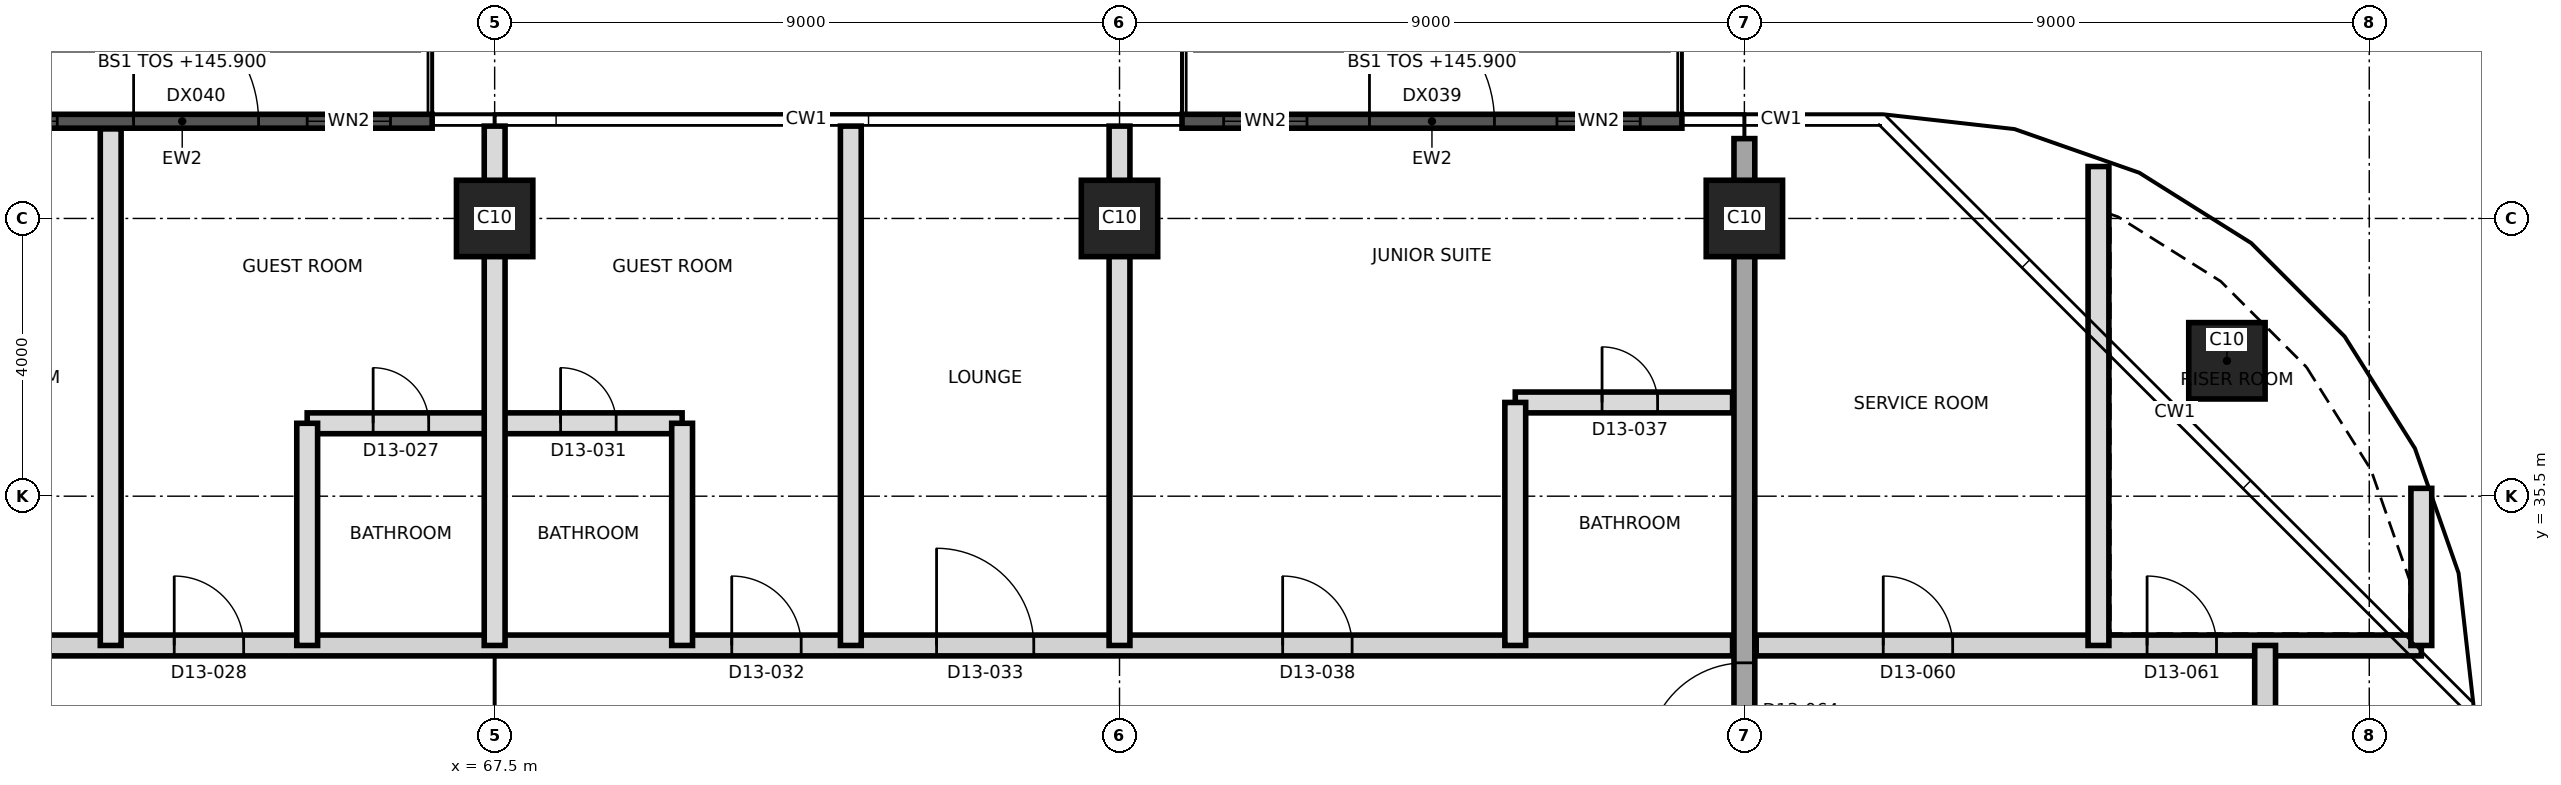
"""IFC4 building model, lengths in metres.
Left out: names, types, materials, properties, quantities, classifications, styles, units other than length and angle.
Written with IfcOpenShell. Run it as: python <this file> out.ifc"""

import sys

from ifc_helpers import new_model, si_unit, direction, frame, frame_2d, origin, origin_2d, place, context, subcontext, project, spatial, rectangle, extrude, element, fill, save


model = new_model("IFC4")
c1 = context("Model", 3, precision=1e-05, world=origin(), true_north=direction((0.0, 1.0)))
c2 = subcontext(c1, "Body", "Model", "MODEL_VIEW")
j1 = project(units=[si_unit("LENGTHUNIT", "METRE"), si_unit("PLANEANGLEUNIT", "RADIAN")], contexts=[c1])
p1 = place(None, origin())
s1 = spatial("IfcSite", under=j1, at=p1, CompositionType="ELEMENT")
p2 = place(p1, origin())
s2 = spatial("IfcBuilding", under=s1, at=p2, CompositionType="ELEMENT")
p3 = place(p2, frame((0.0, 0.0, 145.9)))
s3 = spatial("IfcBuildingStorey", under=s2, at=p3, CompositionType="ELEMENT", Elevation=145.9)
for number, where, z_axis, x_axis in (
    (1, (92.45, 37.45, 0.0), (0.0, 0.0, 1.0), (1.0, 0.0, 0.0)),
    (2, (67.5, 39.5, 0.0), (0.0, 0.0, 1.0), (1.0, 0.0, 0.0)),
    (3, (76.5, 39.5, 0.0), (0.0, 0.0, 1.0), (1.0, 0.0, 0.0)),
    (4, (85.5, 39.5, 0.0), (0.0, 0.0, 1.0), (1.0, 0.0, 0.0)),
):
    element("IfcColumn", number, at=place(p3, frame(where, z_axis=z_axis, x_axis=x_axis)), inside=s3, PredefinedType="COLUMN", context=c2, shape_type="SweptSolid", body=[
        extrude(rectangle(XDim=1.1, YDim=1.1, at=origin_2d()), origin(), (0.0, 0.0, 1.0), 3.7),
    ])
p4 = place(p3, frame((85.5, 20.35, 0.0), z_axis=(0.0, 0.0, 1.0), x_axis=(0.0, 1.0, 0.0)))
e5 = element("IfcWall", 5, at=p4, inside=s3, PredefinedType="SHEAR", context=c2, shape_type="SweptSolid", body=[
    extrude(rectangle(XDim=20.3, YDim=0.3, at=frame_2d((10.15, 0.0))), origin(), (0.0, 0.0, 1.0), 3.7),
])
p5 = place(p4, frame((11.35, 0.0, 0.0)))
e6 = element("IfcOpeningElement", 6, at=p5, cuts=e5, PredefinedType="OPENING", context=c2, shape_type="SweptSolid", body=[
    extrude(rectangle(XDim=1.4, YDim=2.1, at=frame_2d((0.7, 1.05))), frame((0.0, 0.16, 0.0), z_axis=(0.0, -1.0, 0.0), x_axis=(1.0, 0.0, 0.0)), (0.0, 0.0, 1.0), 0.32),
])
p6 = place(p3, frame((77.4, 40.9, 0.0), z_axis=(0.0, 0.0, 1.0), x_axis=(1.0, 0.0, 0.0)))
e7 = element("IfcWall", 7, at=p6, inside=s3, PredefinedType="SOLIDWALL", context=c2, shape_type="SweptSolid", body=[
    extrude(rectangle(XDim=7.2, YDim=0.2, at=frame_2d((3.6, 0.0))), origin(), (0.0, 0.0, 1.0), 3.4),
])
p7 = place(p6, frame((2.7, 0.0, 0.0)))
e8 = element("IfcOpeningElement", 8, at=p7, cuts=e7, PredefinedType="OPENING", context=c2, shape_type="SweptSolid", body=[
    extrude(rectangle(XDim=1.8, YDim=2.4, at=frame_2d((0.9, 1.2))), frame((0.0, 0.11, 0.0), z_axis=(0.0, -1.0, 0.0), x_axis=(1.0, 0.0, 0.0)), (0.0, 0.0, 1.0), 0.22),
])
p8 = place(p6, frame((5.4, 0.0, 0.9)))
e9 = element("IfcOpeningElement", 9, at=p8, cuts=e7, PredefinedType="OPENING", context=c2, shape_type="SweptSolid", body=[
    extrude(rectangle(XDim=1.2, YDim=2.1, at=frame_2d((0.6, 1.05))), frame((0.0, 0.11, 0.0), z_axis=(0.0, -1.0, 0.0), x_axis=(1.0, 0.0, 0.0)), (0.0, 0.0, 1.0), 0.22),
])
p9 = place(p6, frame((0.6, 0.0, 0.9)))
e10 = element("IfcOpeningElement", 10, at=p9, cuts=e7, PredefinedType="OPENING", context=c2, shape_type="SweptSolid", body=[
    extrude(rectangle(XDim=1.2, YDim=2.1, at=frame_2d((0.6, 1.05))), frame((0.0, 0.11, 0.0), z_axis=(0.0, -1.0, 0.0), x_axis=(1.0, 0.0, 0.0)), (0.0, 0.0, 1.0), 0.22),
])
p10 = place(p3, frame((59.4, 40.9, 0.0), z_axis=(0.0, 0.0, 1.0), x_axis=(1.0, 0.0, 0.0)))
e11 = element("IfcWall", 11, at=p10, inside=s3, PredefinedType="SOLIDWALL", context=c2, shape_type="SweptSolid", body=[
    extrude(rectangle(XDim=7.2, YDim=0.2, at=frame_2d((3.6, 0.0))), origin(), (0.0, 0.0, 1.0), 3.4),
])
p11 = place(p10, frame((2.9, 0.0, 0.0)))
e12 = element("IfcOpeningElement", 12, at=p11, cuts=e11, PredefinedType="OPENING", context=c2, shape_type="SweptSolid", body=[
    extrude(rectangle(XDim=1.8, YDim=2.4, at=frame_2d((0.9, 1.2))), frame((0.0, 0.11, 0.0), z_axis=(0.0, -1.0, 0.0), x_axis=(1.0, 0.0, 0.0)), (0.0, 0.0, 1.0), 0.22),
])
p12 = place(p10, frame((5.4, 0.0, 0.9)))
e13 = element("IfcOpeningElement", 13, at=p12, cuts=e11, PredefinedType="OPENING", context=c2, shape_type="SweptSolid", body=[
    extrude(rectangle(XDim=1.2, YDim=2.1, at=frame_2d((0.6, 1.05))), frame((0.0, 0.11, 0.0), z_axis=(0.0, -1.0, 0.0), x_axis=(1.0, 0.0, 0.0)), (0.0, 0.0, 1.0), 0.22),
])
p13 = place(p10, frame((0.6, 0.0, 0.9)))
e14 = element("IfcOpeningElement", 14, at=p13, cuts=e11, PredefinedType="OPENING", context=c2, shape_type="SweptSolid", body=[
    extrude(rectangle(XDim=1.2, YDim=2.1, at=frame_2d((0.6, 1.05))), frame((0.0, 0.11, 0.0), z_axis=(0.0, -1.0, 0.0), x_axis=(1.0, 0.0, 0.0)), (0.0, 0.0, 1.0), 0.22),
])
p14 = place(p3, frame((58.65, 33.35, 0.0), z_axis=(0.0, 0.0, 1.0), x_axis=(1.0, 0.0, 0.0)))
e15 = element("IfcWall", 15, at=p14, inside=s3, PredefinedType="PARTITIONING", context=c2, shape_type="SweptSolid", body=[
    extrude(rectangle(XDim=26.68, YDim=0.3, at=frame_2d((13.34, 0.0))), origin(), (0.0, 0.0, 1.0), 3.3),
])
p15 = place(p14, frame((0.985, 0.0, 0.0)))
e16 = element("IfcOpeningElement", 16, at=p15, cuts=e15, PredefinedType="OPENING", context=c2, shape_type="SweptSolid", body=[
    extrude(rectangle(XDim=1.2, YDim=2.1, at=frame_2d((0.6, 1.05))), frame((0.0, 0.16, 0.0), z_axis=(0.0, -1.0, 0.0), x_axis=(1.0, 0.0, 0.0)), (0.0, 0.0, 1.0), 0.32),
])
p16 = place(p14, frame((4.235, 0.0, 0.0)))
e17 = element("IfcOpeningElement", 17, at=p16, cuts=e15, PredefinedType="OPENING", context=c2, shape_type="SweptSolid", body=[
    extrude(rectangle(XDim=1.0, YDim=2.1, at=frame_2d((0.5, 1.05))), frame((0.0, 0.16, 0.0), z_axis=(0.0, -1.0, 0.0), x_axis=(1.0, 0.0, 0.0)), (0.0, 0.0, 1.0), 0.32),
])
p17 = place(p14, frame((12.265, 0.0, 0.0)))
e18 = element("IfcOpeningElement", 18, at=p17, cuts=e15, PredefinedType="OPENING", context=c2, shape_type="SweptSolid", body=[
    extrude(rectangle(XDim=1.0, YDim=2.1, at=frame_2d((0.5, 1.05))), frame((0.0, 0.16, 0.0), z_axis=(0.0, -1.0, 0.0), x_axis=(1.0, 0.0, 0.0)), (0.0, 0.0, 1.0), 0.32),
])
p18 = place(p14, frame((15.215, 0.0, 0.0)))
e19 = element("IfcOpeningElement", 19, at=p18, cuts=e15, PredefinedType="OPENING", context=c2, shape_type="SweptSolid", body=[
    extrude(rectangle(XDim=1.4, YDim=2.1, at=frame_2d((0.7, 1.05))), frame((0.0, 0.16, 0.0), z_axis=(0.0, -1.0, 0.0), x_axis=(1.0, 0.0, 0.0)), (0.0, 0.0, 1.0), 0.32),
])
p19 = place(p14, frame((20.2, 0.0, 0.0)))
e20 = element("IfcOpeningElement", 20, at=p19, cuts=e15, PredefinedType="OPENING", context=c2, shape_type="SweptSolid", body=[
    extrude(rectangle(XDim=1.0, YDim=2.4, at=frame_2d((0.5, 1.2))), frame((0.0, 0.16, 0.0), z_axis=(0.0, -1.0, 0.0), x_axis=(1.0, 0.0, 0.0)), (0.0, 0.0, 1.0), 0.32),
])
p20 = place(p3, frame((85.67, 33.35, 0.0), z_axis=(0.0, 0.0, 1.0), x_axis=(1.0, 0.0, 0.0)))
e21 = element("IfcWall", 21, at=p20, inside=s3, PredefinedType="PARTITIONING", context=c2, shape_type="SweptSolid", body=[
    extrude(rectangle(XDim=9.58, YDim=0.3, at=frame_2d((4.79, 0.0))), origin(), (0.0, 0.0, 1.0), 3.3),
])
p21 = place(p20, frame((1.83, 0.0, 0.0)))
e22 = element("IfcOpeningElement", 22, at=p21, cuts=e21, PredefinedType="OPENING", context=c2, shape_type="SweptSolid", body=[
    extrude(rectangle(XDim=1.0, YDim=2.1, at=frame_2d((0.5, 1.05))), frame((0.0, 0.16, 0.0), z_axis=(0.0, -1.0, 0.0), x_axis=(1.0, 0.0, 0.0)), (0.0, 0.0, 1.0), 0.32),
])
p22 = place(p20, frame((5.63, 0.0, 0.0)))
e23 = element("IfcOpeningElement", 23, at=p22, cuts=e21, PredefinedType="OPENING", context=c2, shape_type="SweptSolid", body=[
    extrude(rectangle(XDim=1.0, YDim=2.1, at=frame_2d((0.5, 1.05))), frame((0.0, 0.16, 0.0), z_axis=(0.0, -1.0, 0.0), x_axis=(1.0, 0.0, 0.0)), (0.0, 0.0, 1.0), 0.32),
])
p23 = place(p3, frame((64.8, 36.55, 0.0), z_axis=(0.0, 0.0, 1.0), x_axis=(1.0, 0.0, 0.0)))
e24 = element("IfcWall", 24, at=p23, inside=s3, PredefinedType="PARTITIONING", context=c2, shape_type="SweptSolid", body=[
    extrude(rectangle(XDim=5.4, YDim=0.3, at=frame_2d((2.7, 0.0))), origin(), (0.0, 0.0, 1.0), 3.3),
])
p24 = place(p23, frame((0.95, 0.0, 0.0)))
e25 = element("IfcOpeningElement", 25, at=p24, cuts=e24, PredefinedType="OPENING", context=c2, shape_type="SweptSolid", body=[
    extrude(rectangle(XDim=0.8, YDim=2.1, at=frame_2d((0.4, 1.05))), frame((0.0, 0.16, 0.0), z_axis=(0.0, -1.0, 0.0), x_axis=(1.0, 0.0, 0.0)), (0.0, 0.0, 1.0), 0.32),
])
p25 = place(p23, frame((3.65, 0.0, 0.0)))
e26 = element("IfcOpeningElement", 26, at=p25, cuts=e24, PredefinedType="OPENING", context=c2, shape_type="SweptSolid", body=[
    extrude(rectangle(XDim=0.8, YDim=2.1, at=frame_2d((0.4, 1.05))), frame((0.0, 0.16, 0.0), z_axis=(0.0, -1.0, 0.0), x_axis=(1.0, 0.0, 0.0)), (0.0, 0.0, 1.0), 0.32),
])
p26 = place(p3, frame((82.2, 36.85, 0.0), z_axis=(0.0, 0.0, 1.0), x_axis=(1.0, 0.0, 0.0)))
e27 = element("IfcWall", 27, at=p26, inside=s3, PredefinedType="PARTITIONING", context=c2, shape_type="SweptSolid", body=[
    extrude(rectangle(XDim=3.13, YDim=0.3, at=frame_2d((1.565, 0.0))), origin(), (0.0, 0.0, 1.0), 3.3),
])
p27 = place(p26, frame((1.25, 0.0, 0.0)))
e28 = element("IfcOpeningElement", 28, at=p27, cuts=e27, PredefinedType="OPENING", context=c2, shape_type="SweptSolid", body=[
    extrude(rectangle(XDim=0.8, YDim=2.1, at=frame_2d((0.4, 1.05))), frame((0.0, 0.16, 0.0), z_axis=(0.0, -1.0, 0.0), x_axis=(1.0, 0.0, 0.0)), (0.0, 0.0, 1.0), 0.32),
])
p28 = place(p3, frame((61.97, 33.35, 0.0), z_axis=(0.0, 0.0, 1.0), x_axis=(0.0, 1.0, 0.0)))
e29 = element("IfcWall", 29, at=p28, inside=s3, PredefinedType="PARTITIONING", context=c2, shape_type="SweptSolid", body=[
    extrude(rectangle(XDim=7.44, YDim=0.3, at=frame_2d((3.72, 0.0))), origin(), (0.0, 0.0, 1.0), 3.4),
])
p29 = place(p3, frame((64.8, 33.35, 0.0), z_axis=(0.0, 0.0, 1.0), x_axis=(0.0, 1.0, 0.0)))
e30 = element("IfcWall", 30, at=p29, inside=s3, PredefinedType="PARTITIONING", context=c2, shape_type="SweptSolid", body=[
    extrude(rectangle(XDim=3.2, YDim=0.3, at=frame_2d((1.6, 0.0))), origin(), (0.0, 0.0, 1.0), 3.4),
])
p30 = place(p3, frame((67.5, 33.35, 0.0), z_axis=(0.0, 0.0, 1.0), x_axis=(0.0, 1.0, 0.0)))
e31 = element("IfcWall", 31, at=p30, inside=s3, PredefinedType="PARTITIONING", context=c2, shape_type="SweptSolid", body=[
    extrude(rectangle(XDim=7.48, YDim=0.3, at=frame_2d((3.74, 0.0))), origin(), (0.0, 0.0, 1.0), 3.3),
])
p31 = place(p3, frame((70.2, 33.35, 0.0), z_axis=(0.0, 0.0, 1.0), x_axis=(0.0, 1.0, 0.0)))
e32 = element("IfcWall", 32, at=p31, inside=s3, PredefinedType="PARTITIONING", context=c2, shape_type="SweptSolid", body=[
    extrude(rectangle(XDim=3.2, YDim=0.3, at=frame_2d((1.6, 0.0))), origin(), (0.0, 0.0, 1.0), 3.3),
])
for number, where, z_axis, x_axis in (
    (33, (72.63, 33.35, 0.0), (0.0, 0.0, 1.0), (0.0, 1.0, 0.0)),
    (34, (76.5, 33.35, 0.0), (0.0, 0.0, 1.0), (0.0, 1.0, 0.0)),
):
    element("IfcWall", number, at=place(p3, frame(where, z_axis=z_axis, x_axis=x_axis)), inside=s3, PredefinedType="PARTITIONING", context=c2, shape_type="SweptSolid", body=[
        extrude(rectangle(XDim=7.48, YDim=0.3, at=frame_2d((3.74, 0.0))), origin(), (0.0, 0.0, 1.0), 3.3),
    ])
p32 = place(p3, frame((82.2, 33.35, 0.0), z_axis=(0.0, 0.0, 1.0), x_axis=(0.0, 1.0, 0.0)))
e35 = element("IfcWall", 35, at=p32, inside=s3, PredefinedType="PARTITIONING", context=c2, shape_type="SweptSolid", body=[
    extrude(rectangle(XDim=3.5, YDim=0.3, at=frame_2d((1.75, 0.0))), origin(), (0.0, 0.0, 1.0), 3.3),
])
p33 = place(p3, frame((90.6, 33.35, 0.0), z_axis=(0.0, 0.0, 1.0), x_axis=(0.0, 1.0, 0.0)))
e36 = element("IfcWall", 36, at=p33, inside=s3, PredefinedType="PARTITIONING", context=c2, shape_type="SweptSolid", body=[
    extrude(rectangle(XDim=6.898, YDim=0.3, at=frame_2d((3.449, 0.0))), origin(), (0.0, 0.0, 1.0), 3.4),
])
p34 = place(p3, frame((93.0, 30.65, 0.0), z_axis=(0.0, 0.0, 1.0), x_axis=(0.0, 1.0, 0.0)))
e37 = element("IfcWall", 37, at=p34, inside=s3, PredefinedType="PARTITIONING", context=c2, shape_type="SweptSolid", body=[
    extrude(rectangle(XDim=2.7, YDim=0.3, at=frame_2d((1.35, 0.0))), origin(), (0.0, 0.0, 1.0), 3.4),
])
p35 = place(p3, frame((95.25, 33.35, 0.0), z_axis=(0.0, 0.0, 1.0), x_axis=(0.0, 1.0, 0.0)))
e38 = element("IfcWall", 38, at=p35, inside=s3, PredefinedType="PARTITIONING", context=c2, shape_type="SweptSolid", body=[
    extrude(rectangle(XDim=2.263, YDim=0.3, at=frame_2d((1.131, 0.0))), origin(), (0.0, 0.0, 1.0), 3.4),
])
p36 = place(p7, origin())
e39 = element("IfcDoor", 39, at=p36, inside=s3, OperationType="SINGLE_SWING_LEFT", PredefinedType="DOOR", context=c2, shape_type="SweptSolid", body=[
    extrude(rectangle(XDim=1.8, YDim=2.4, at=frame_2d((0.9, 1.2))), frame((0.0, 0.025, 0.0), z_axis=(0.0, -1.0, 0.0), x_axis=(1.0, 0.0, 0.0)), (0.0, 0.0, 1.0), 0.05),
])
fill(e8, e39)
p37 = place(p8, origin())
e40 = element("IfcWindow", 40, at=p37, inside=s3, PartitioningType="SINGLE_PANEL", PredefinedType="WINDOW", context=c2, shape_type="SweptSolid", body=[
    extrude(rectangle(XDim=1.2, YDim=2.1, at=frame_2d((0.6, 1.05))), frame((0.0, 0.03, 0.0), z_axis=(0.0, -1.0, 0.0), x_axis=(1.0, 0.0, 0.0)), (0.0, 0.0, 1.0), 0.06),
])
fill(e9, e40)
p38 = place(p9, origin())
e41 = element("IfcWindow", 41, at=p38, inside=s3, PartitioningType="SINGLE_PANEL", PredefinedType="WINDOW", context=c2, shape_type="SweptSolid", body=[
    extrude(rectangle(XDim=1.2, YDim=2.1, at=frame_2d((0.6, 1.05))), frame((0.0, 0.03, 0.0), z_axis=(0.0, -1.0, 0.0), x_axis=(1.0, 0.0, 0.0)), (0.0, 0.0, 1.0), 0.06),
])
fill(e10, e41)
p39 = place(p11, origin())
e42 = element("IfcDoor", 42, at=p39, inside=s3, OperationType="SINGLE_SWING_LEFT", PredefinedType="DOOR", context=c2, shape_type="SweptSolid", body=[
    extrude(rectangle(XDim=1.8, YDim=2.4, at=frame_2d((0.9, 1.2))), frame((0.0, 0.025, 0.0), z_axis=(0.0, -1.0, 0.0), x_axis=(1.0, 0.0, 0.0)), (0.0, 0.0, 1.0), 0.05),
])
fill(e12, e42)
p40 = place(p12, origin())
e43 = element("IfcWindow", 43, at=p40, inside=s3, PartitioningType="SINGLE_PANEL", PredefinedType="WINDOW", context=c2, shape_type="SweptSolid", body=[
    extrude(rectangle(XDim=1.2, YDim=2.1, at=frame_2d((0.6, 1.05))), frame((0.0, 0.03, 0.0), z_axis=(0.0, -1.0, 0.0), x_axis=(1.0, 0.0, 0.0)), (0.0, 0.0, 1.0), 0.06),
])
fill(e13, e43)
p41 = place(p13, origin())
e44 = element("IfcWindow", 44, at=p41, inside=s3, PartitioningType="SINGLE_PANEL", PredefinedType="WINDOW", context=c2, shape_type="SweptSolid", body=[
    extrude(rectangle(XDim=1.2, YDim=2.1, at=frame_2d((0.6, 1.05))), frame((0.0, 0.03, 0.0), z_axis=(0.0, -1.0, 0.0), x_axis=(1.0, 0.0, 0.0)), (0.0, 0.0, 1.0), 0.06),
])
fill(e14, e44)
p42 = place(p24, origin())
e45 = element("IfcDoor", 45, at=p42, inside=s3, OperationType="SINGLE_SWING_RIGHT", PredefinedType="DOOR", context=c2, shape_type="SweptSolid", body=[
    extrude(rectangle(XDim=0.8, YDim=2.1, at=frame_2d((0.4, 1.05))), frame((0.0, 0.025, 0.0), z_axis=(0.0, -1.0, 0.0), x_axis=(1.0, 0.0, 0.0)), (0.0, 0.0, 1.0), 0.05),
])
fill(e25, e45)
p43 = place(p16, origin())
e46 = element("IfcDoor", 46, at=p43, inside=s3, OperationType="SINGLE_SWING_LEFT", PredefinedType="DOOR", context=c2, shape_type="SweptSolid", body=[
    extrude(rectangle(XDim=1.0, YDim=2.1, at=frame_2d((0.5, 1.05))), frame((0.0, 0.025, 0.0), z_axis=(0.0, -1.0, 0.0), x_axis=(1.0, 0.0, 0.0)), (0.0, 0.0, 1.0), 0.05),
])
fill(e17, e46)
p44 = place(p25, origin())
e47 = element("IfcDoor", 47, at=p44, inside=s3, OperationType="SINGLE_SWING_LEFT", PredefinedType="DOOR", context=c2, shape_type="SweptSolid", body=[
    extrude(rectangle(XDim=0.8, YDim=2.1, at=frame_2d((0.4, 1.05))), frame((0.0, 0.025, 0.0), z_axis=(0.0, -1.0, 0.0), x_axis=(1.0, 0.0, 0.0)), (0.0, 0.0, 1.0), 0.05),
])
fill(e26, e47)
p45 = place(p17, origin())
e48 = element("IfcDoor", 48, at=p45, inside=s3, OperationType="SINGLE_SWING_RIGHT", PredefinedType="DOOR", context=c2, shape_type="SweptSolid", body=[
    extrude(rectangle(XDim=1.0, YDim=2.1, at=frame_2d((0.5, 1.05))), frame((0.0, 0.025, 0.0), z_axis=(0.0, -1.0, 0.0), x_axis=(1.0, 0.0, 0.0)), (0.0, 0.0, 1.0), 0.05),
])
fill(e18, e48)
p46 = place(p18, origin())
e49 = element("IfcDoor", 49, at=p46, inside=s3, OperationType="SINGLE_SWING_LEFT", PredefinedType="DOOR", context=c2, shape_type="SweptSolid", body=[
    extrude(rectangle(XDim=1.4, YDim=2.1, at=frame_2d((0.7, 1.05))), frame((0.0, 0.025, 0.0), z_axis=(0.0, -1.0, 0.0), x_axis=(1.0, 0.0, 0.0)), (0.0, 0.0, 1.0), 0.05),
])
fill(e19, e49)
p47 = place(p27, origin())
e50 = element("IfcDoor", 50, at=p47, inside=s3, OperationType="SINGLE_SWING_LEFT", PredefinedType="DOOR", context=c2, shape_type="SweptSolid", body=[
    extrude(rectangle(XDim=0.8, YDim=2.1, at=frame_2d((0.4, 1.05))), frame((0.0, 0.025, 0.0), z_axis=(0.0, -1.0, 0.0), x_axis=(1.0, 0.0, 0.0)), (0.0, 0.0, 1.0), 0.05),
])
fill(e28, e50)
p48 = place(p19, origin())
e51 = element("IfcDoor", 51, at=p48, inside=s3, OperationType="SINGLE_SWING_RIGHT", PredefinedType="DOOR", context=c2, shape_type="SweptSolid", body=[
    extrude(rectangle(XDim=1.0, YDim=2.4, at=frame_2d((0.5, 1.2))), frame((0.0, 0.025, 0.0), z_axis=(0.0, -1.0, 0.0), x_axis=(1.0, 0.0, 0.0)), (0.0, 0.0, 1.0), 0.05),
])
fill(e20, e51)
p49 = place(p21, origin())
e52 = element("IfcDoor", 52, at=p49, inside=s3, OperationType="SINGLE_SWING_LEFT", PredefinedType="DOOR", context=c2, shape_type="SweptSolid", body=[
    extrude(rectangle(XDim=1.0, YDim=2.1, at=frame_2d((0.5, 1.05))), frame((0.0, 0.025, 0.0), z_axis=(0.0, -1.0, 0.0), x_axis=(1.0, 0.0, 0.0)), (0.0, 0.0, 1.0), 0.05),
])
fill(e22, e52)
p50 = place(p22, origin())
e53 = element("IfcDoor", 53, at=p50, inside=s3, OperationType="SINGLE_SWING_RIGHT", PredefinedType="DOOR", context=c2, shape_type="SweptSolid", body=[
    extrude(rectangle(XDim=1.0, YDim=2.1, at=frame_2d((0.5, 1.05))), frame((0.0, 0.025, 0.0), z_axis=(0.0, -1.0, 0.0), x_axis=(1.0, 0.0, 0.0)), (0.0, 0.0, 1.0), 0.05),
])
fill(e23, e53)
p51 = place(p5, origin())
e54 = element("IfcDoor", 54, at=p51, inside=s3, OperationType="SINGLE_SWING_RIGHT", PredefinedType="DOOR", context=c2, shape_type="SweptSolid", body=[
    extrude(rectangle(XDim=1.4, YDim=2.1, at=frame_2d((0.7, 1.05))), frame((0.0, 0.025, 0.0), z_axis=(0.0, -1.0, 0.0), x_axis=(1.0, 0.0, 0.0)), (0.0, 0.0, 1.0), 0.05),
])
fill(e6, e54)
save(model, sys.argv[1])
